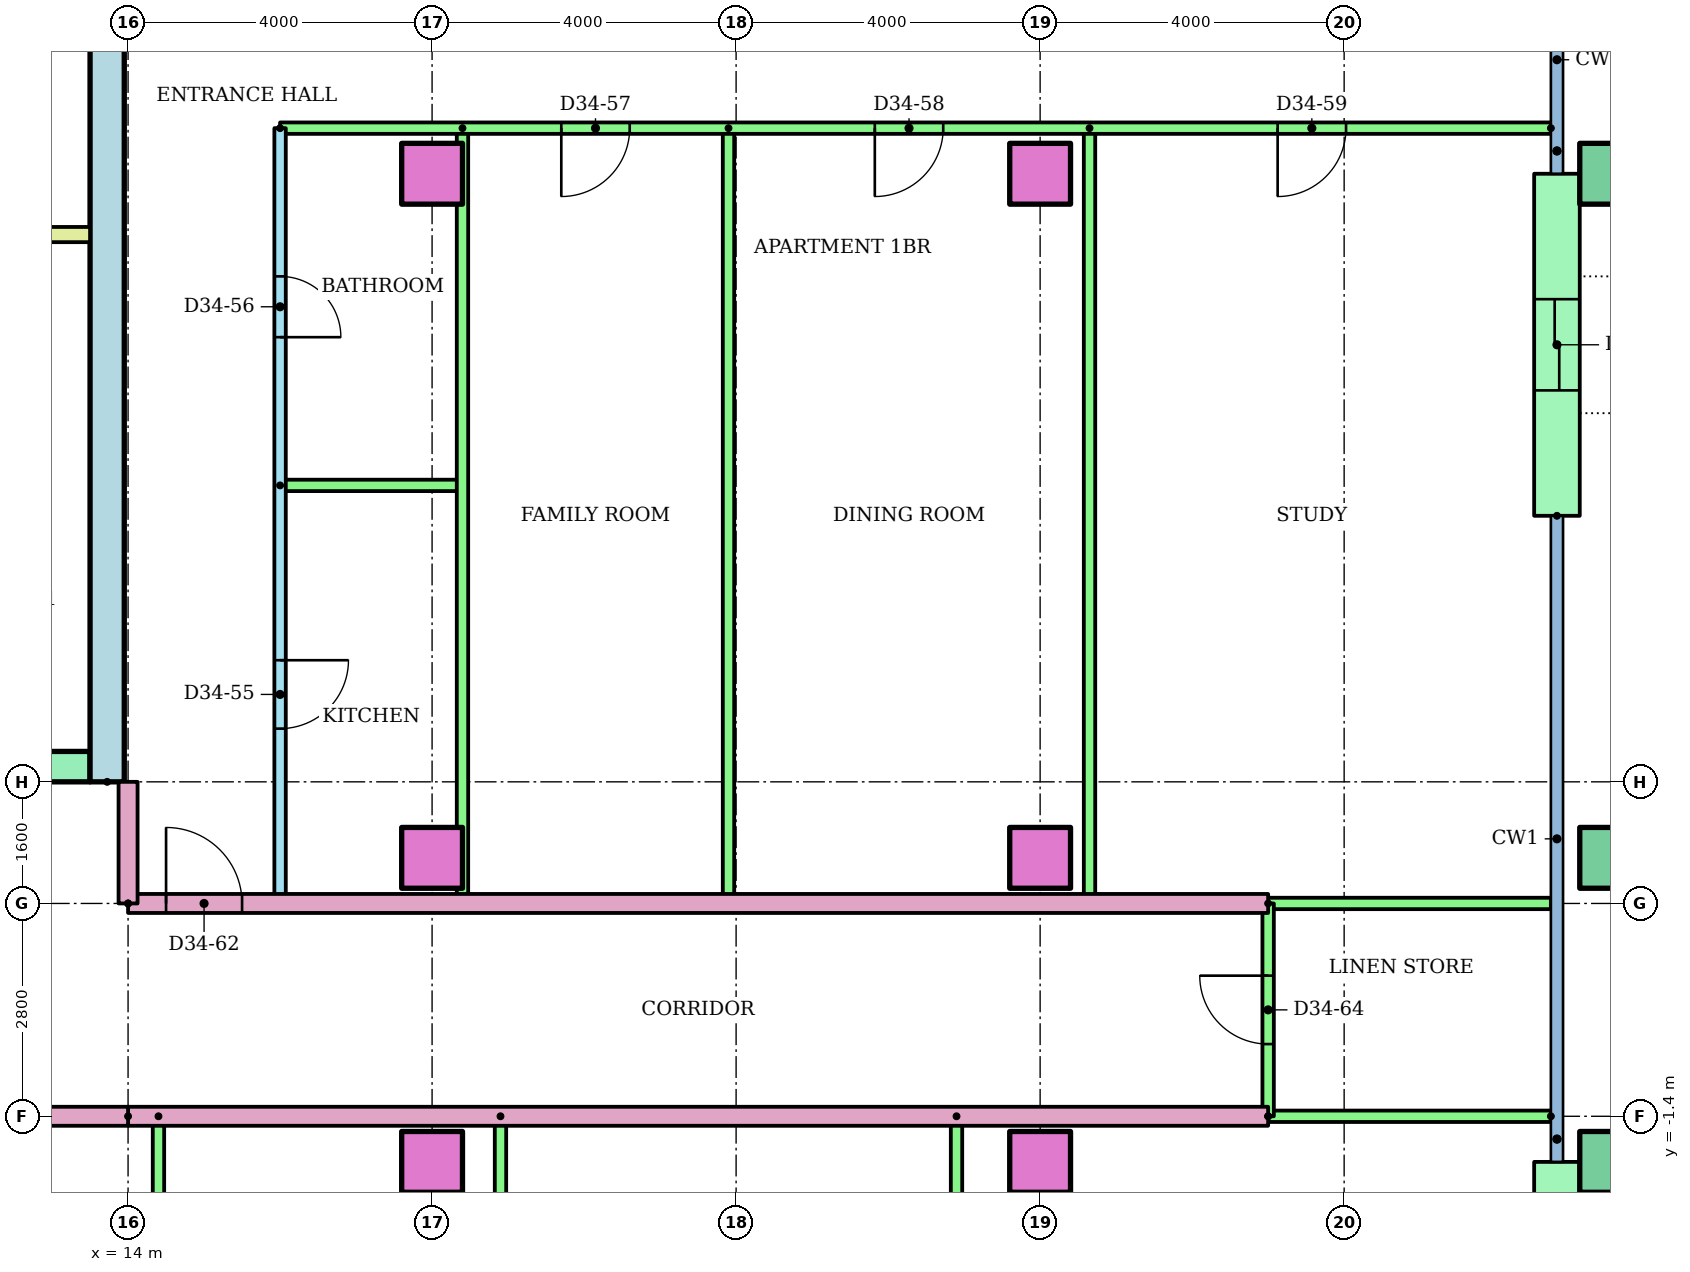
"""IFC4 building model, lengths in metres.
Left out: names, types, materials, properties, quantities, classifications, styles, units other than length and angle.
Written with IfcOpenShell. Run it as: python <this file> out.ifc"""

import sys

from ifc_helpers import new_model, si_unit, direction, frame, frame_2d, origin, origin_2d, place, context, subcontext, project, spatial, rectangle, hollow_rectangle, extrude, element, fill, save


model = new_model("IFC4")
c1 = context("Model", 3, precision=1e-05, world=origin(), true_north=direction((0.0, 1.0)))
c2 = subcontext(c1, "Body", "Model", "MODEL_VIEW")
j1 = project(units=[si_unit("LENGTHUNIT", "METRE"), si_unit("PLANEANGLEUNIT", "RADIAN")], contexts=[c1])
p1 = place(None, origin())
s1 = spatial("IfcSite", under=j1, at=p1, CompositionType="ELEMENT")
p2 = place(p1, origin())
s2 = spatial("IfcBuilding", under=s1, at=p2, CompositionType="ELEMENT")
p3 = place(p2, frame((0.0, 0.0, 132.6)))
s3 = spatial("IfcBuildingStorey", under=s2, at=p3, CompositionType="ELEMENT", Elevation=132.6)
for number, where in (
    (1, (18.0, -2.0, 0.0)),
    (2, (26.0, -2.0, 0.0)),
):
    element("IfcColumn", number, at=place(p3, frame(where)), inside=s3, PredefinedType="COLUMN", context=c2, shape_type="SweptSolid", body=[
        extrude(rectangle(XDim=0.8, YDim=0.8, at=origin_2d()), origin(), (0.0, 0.0, 1.0), 3.2),
    ])
p4 = place(p3, frame((33.5, -2.0, 0.0)))
e3 = element("IfcColumn", 3, at=p4, inside=s3, PredefinedType="COLUMN", context=c2, shape_type="SweptSolid", body=[
    extrude(hollow_rectangle(XDim=0.8, YDim=0.8, WallThickness=0.04, at=origin_2d()), origin(), (0.0, 0.0, 1.0), 3.2),
])
for number, where in (
    (4, (18.0, 2.0, 0.0)),
    (5, (26.0, 2.0, 0.0)),
):
    element("IfcColumn", number, at=place(p3, frame(where)), inside=s3, PredefinedType="COLUMN", context=c2, shape_type="SweptSolid", body=[
        extrude(rectangle(XDim=0.8, YDim=0.8, at=origin_2d()), origin(), (0.0, 0.0, 1.0), 3.2),
    ])
p5 = place(p3, frame((33.5, 2.0, 0.0)))
e6 = element("IfcColumn", 6, at=p5, inside=s3, PredefinedType="COLUMN", context=c2, shape_type="SweptSolid", body=[
    extrude(hollow_rectangle(XDim=0.8, YDim=0.8, WallThickness=0.04, at=origin_2d()), origin(), (0.0, 0.0, 1.0), 3.2),
])
for number, where in (
    (7, (18.0, 11.0, 0.0)),
    (8, (26.0, 11.0, 0.0)),
):
    element("IfcColumn", number, at=place(p3, frame(where)), inside=s3, PredefinedType="COLUMN", context=c2, shape_type="SweptSolid", body=[
        extrude(rectangle(XDim=0.8, YDim=0.8, at=origin_2d()), origin(), (0.0, 0.0, 1.0), 3.2),
    ])
p6 = place(p3, frame((33.5, 11.0, 0.0)))
e9 = element("IfcColumn", 9, at=p6, inside=s3, PredefinedType="COLUMN", context=c2, shape_type="SweptSolid", body=[
    extrude(hollow_rectangle(XDim=0.8, YDim=0.8, WallThickness=0.04, at=origin_2d()), origin(), (0.0, 0.0, 1.0), 3.2),
])
p7 = place(p3, frame((32.8, -5.7, 0.0), z_axis=(0.0, 0.0, 1.0), x_axis=(0.0, 1.0, 0.0)))
e10 = element("IfcWall", 10, at=p7, inside=s3, PredefinedType="STANDARD", context=c2, shape_type="SweptSolid", body=[
    extrude(rectangle(XDim=3.7, YDim=0.6, at=frame_2d((1.85, 0.0))), origin(), (0.0, 0.0, 1.0), 2.92),
])
p8 = place(p7, frame((1.25, 0.0, 0.0)))
e11 = element("IfcOpeningElement", 11, at=p8, cuts=e10, PredefinedType="OPENING", context=c2, shape_type="SweptSolid", body=[
    extrude(rectangle(XDim=1.2, YDim=2.1, at=frame_2d((0.6, 1.05))), frame((0.0, 0.31, 0.0), z_axis=(0.0, -1.0, 0.0), x_axis=(1.0, 0.0, 0.0)), (0.0, 0.0, 1.0), 0.62),
])
p9 = place(p3, frame((32.8, 6.5, 0.0), z_axis=(0.0, 0.0, 1.0), x_axis=(0.0, 1.0, 0.0)))
e12 = element("IfcWall", 12, at=p9, inside=s3, PredefinedType="STANDARD", context=c2, shape_type="SweptSolid", body=[
    extrude(rectangle(XDim=4.5, YDim=0.6, at=frame_2d((2.25, 0.0))), origin(), (0.0, 0.0, 1.0), 2.92),
])
p10 = place(p9, frame((1.65, 0.0, 0.0)))
e13 = element("IfcOpeningElement", 13, at=p10, cuts=e12, PredefinedType="OPENING", context=c2, shape_type="SweptSolid", body=[
    extrude(rectangle(XDim=1.2, YDim=2.1, at=frame_2d((0.6, 1.05))), frame((0.0, 0.31, 0.0), z_axis=(0.0, -1.0, 0.0), x_axis=(1.0, 0.0, 0.0)), (0.0, 0.0, 1.0), 0.62),
])
p11 = place(p3, frame((13.725, 3.0, 0.0), z_axis=(0.0, 0.0, 1.0), x_axis=(0.0, 1.0, 0.0)))
e14 = element("IfcWall", 14, at=p11, inside=s3, PredefinedType="SHEAR", context=c2, shape_type="SweptSolid", body=[
    extrude(rectangle(XDim=17.0, YDim=0.45, at=frame_2d((8.5, 0.0))), origin(), (0.0, 0.0, 1.0), 2.92),
])
p12 = place(p3, frame((-13.5, 3.2, 0.0)))
e15 = element("IfcWall", 15, at=p12, inside=s3, PredefinedType="SHEAR", context=c2, shape_type="SweptSolid", body=[
    extrude(rectangle(XDim=27.0, YDim=0.4, at=frame_2d((13.5, 0.0))), origin(), (0.0, 0.0, 1.0), 2.92),
])
p13 = place(p12, frame((6.861, 0.0, 0.0)))
e16 = element("IfcOpeningElement", 16, at=p13, cuts=e15, PredefinedType="OPENING", context=c2, shape_type="SweptSolid", body=[
    extrude(rectangle(XDim=1.1, YDim=2.1, at=frame_2d((0.55, 1.05))), frame((0.0, 0.21, 0.0), z_axis=(0.0, -1.0, 0.0), x_axis=(1.0, 0.0, 0.0)), (0.0, 0.0, 1.0), 0.42),
])
p14 = place(p12, frame((9.906, 0.0, 0.0)))
e17 = element("IfcOpeningElement", 17, at=p14, cuts=e15, PredefinedType="OPENING", context=c2, shape_type="SweptSolid", body=[
    extrude(rectangle(XDim=1.1, YDim=2.1, at=frame_2d((0.55, 1.05))), frame((0.0, 0.21, 0.0), z_axis=(0.0, -1.0, 0.0), x_axis=(1.0, 0.0, 0.0)), (0.0, 0.0, 1.0), 0.42),
])
p15 = place(p12, frame((15.994, 0.0, 0.0)))
e18 = element("IfcOpeningElement", 18, at=p15, cuts=e15, PredefinedType="OPENING", context=c2, shape_type="SweptSolid", body=[
    extrude(rectangle(XDim=1.1, YDim=2.1, at=frame_2d((0.55, 1.05))), frame((0.0, 0.21, 0.0), z_axis=(0.0, -1.0, 0.0), x_axis=(1.0, 0.0, 0.0)), (0.0, 0.0, 1.0), 0.42),
])
p16 = place(p12, frame((19.039, 0.0, 0.0)))
e19 = element("IfcOpeningElement", 19, at=p16, cuts=e15, PredefinedType="OPENING", context=c2, shape_type="SweptSolid", body=[
    extrude(rectangle(XDim=1.1, YDim=2.1, at=frame_2d((0.55, 1.05))), frame((0.0, 0.21, 0.0), z_axis=(0.0, -1.0, 0.0), x_axis=(1.0, 0.0, 0.0)), (0.0, 0.0, 1.0), 0.42),
])
p17 = place(p12, frame((12.6, 0.0, 0.0)))
e20 = element("IfcOpeningElement", 20, at=p17, cuts=e15, PredefinedType="OPENING", context=c2, shape_type="SweptSolid", body=[
    extrude(rectangle(XDim=1.8, YDim=2.1, at=frame_2d((0.9, 1.05))), frame((0.0, 0.21, 0.0), z_axis=(0.0, -1.0, 0.0), x_axis=(1.0, 0.0, 0.0)), (0.0, 0.0, 1.0), 0.42),
])
p18 = place(p3, frame((9.6, 10.2, 0.0)))
e21 = element("IfcWall", 21, at=p18, inside=s3, PredefinedType="PARTITIONING", context=c2, shape_type="SweptSolid", body=[
    extrude(rectangle(XDim=3.9, YDim=0.2, at=frame_2d((1.95, 0.0))), origin(), (0.0, 0.0, 1.0), 2.92),
])
for number, where, z_axis, x_axis in (
    (22, (14.4, -1.4, 0.0), (0.0, 0.0, 1.0), (0.0, -1.0, 0.0)),
    (23, (18.9, -1.4, 0.0), (0.0, 0.0, 1.0), (0.0, -1.0, 0.0)),
    (24, (24.9, -1.4, 0.0), (0.0, 0.0, 1.0), (0.0, -1.0, 0.0)),
):
    element("IfcWall", number, at=place(p3, frame(where, z_axis=z_axis, x_axis=x_axis)), inside=s3, PredefinedType="PARTITIONING", context=c2, shape_type="SweptSolid", body=[
        extrude(rectangle(XDim=7.8, YDim=0.15, at=frame_2d((3.9, 0.0))), origin(), (0.0, 0.0, 1.0), 2.4),
    ])
p19 = place(p3, frame((29.0, -1.4, 0.0), z_axis=(0.0, 0.0, 1.0), x_axis=(-1.0, 0.0, 0.0)))
e25 = element("IfcWall", 25, at=p19, inside=s3, PredefinedType="PARTITIONING", context=c2, shape_type="SweptSolid", body=[
    extrude(rectangle(XDim=15.0, YDim=0.25, at=frame_2d((7.5, 0.0))), origin(), (0.0, 0.0, 1.0), 2.4),
])
p20 = place(p3, frame((32.72, -1.4, 0.0), z_axis=(0.0, 0.0, 1.0), x_axis=(-1.0, 0.0, 0.0)))
e26 = element("IfcWall", 26, at=p20, inside=s3, PredefinedType="PARTITIONING", context=c2, shape_type="SweptSolid", body=[
    extrude(rectangle(XDim=3.72, YDim=0.15, at=frame_2d((1.86, 0.0))), origin(), (0.0, 0.0, 1.0), 2.4),
])
p21 = place(p3, frame((16.0, 11.6, 0.0), z_axis=(0.0, 0.0, 1.0), x_axis=(0.0, -1.0, 0.0)))
e27 = element("IfcWall", 27, at=p21, inside=s3, PredefinedType="PARTITIONING", context=c2, shape_type="SweptSolid", body=[
    extrude(rectangle(XDim=10.2, YDim=0.15, at=frame_2d((5.1, 0.0))), origin(), (0.0, 0.0, 1.0), 2.4),
])
p22 = place(p21, frame((7.0, 0.0, 0.0)))
e28 = element("IfcOpeningElement", 28, at=p22, cuts=e27, PredefinedType="OPENING", context=c2, shape_type="SweptSolid", body=[
    extrude(rectangle(XDim=0.9, YDim=2.1, at=frame_2d((0.45, 1.05))), frame((0.0, 0.085, 0.0), z_axis=(0.0, -1.0, 0.0), x_axis=(1.0, 0.0, 0.0)), (0.0, 0.0, 1.0), 0.17),
])
p23 = place(p21, frame((1.95, 0.0, 0.0)))
e29 = element("IfcOpeningElement", 29, at=p23, cuts=e27, PredefinedType="OPENING", context=c2, shape_type="SweptSolid", body=[
    extrude(rectangle(XDim=0.8, YDim=2.1, at=frame_2d((0.4, 1.05))), frame((0.0, 0.085, 0.0), z_axis=(0.0, -1.0, 0.0), x_axis=(1.0, 0.0, 0.0)), (0.0, 0.0, 1.0), 0.17),
])
p24 = place(p3, frame((16.0, 6.9, 0.0)))
e30 = element("IfcWall", 30, at=p24, inside=s3, PredefinedType="PARTITIONING", context=c2, shape_type="SweptSolid", body=[
    extrude(rectangle(XDim=2.4, YDim=0.15, at=frame_2d((1.2, 0.0))), origin(), (0.0, 0.0, 1.0), 2.4),
])
for number, where, z_axis, x_axis in (
    (31, (18.4, 11.6, 0.0), (0.0, 0.0, 1.0), (0.0, -1.0, 0.0)),
    (32, (21.9, 11.6, 0.0), (0.0, 0.0, 1.0), (0.0, -1.0, 0.0)),
    (33, (26.65, 11.6, 0.0), (0.0, 0.0, 1.0), (0.0, -1.0, 0.0)),
):
    element("IfcWall", number, at=place(p3, frame(where, z_axis=z_axis, x_axis=x_axis)), inside=s3, PredefinedType="PARTITIONING", context=c2, shape_type="SweptSolid", body=[
        extrude(rectangle(XDim=10.2, YDim=0.15, at=frame_2d((5.1, 0.0))), origin(), (0.0, 0.0, 1.0), 2.4),
    ])
p25 = place(p3, frame((32.72, 11.6, 0.0), z_axis=(0.0, 0.0, 1.0), x_axis=(-1.0, 0.0, 0.0)))
e34 = element("IfcWall", 34, at=p25, inside=s3, PredefinedType="PARTITIONING", context=c2, shape_type="SweptSolid", body=[
    extrude(rectangle(XDim=16.72, YDim=0.15, at=frame_2d((8.36, 0.0))), origin(), (0.0, 0.0, 1.0), 2.4),
])
p26 = place(p25, frame((12.12, 0.0, 0.0)))
e35 = element("IfcOpeningElement", 35, at=p26, cuts=e34, PredefinedType="OPENING", context=c2, shape_type="SweptSolid", body=[
    extrude(rectangle(XDim=0.9, YDim=2.1, at=frame_2d((0.45, 1.05))), frame((0.0, 0.085, 0.0), z_axis=(0.0, -1.0, 0.0), x_axis=(1.0, 0.0, 0.0)), (0.0, 0.0, 1.0), 0.17),
])
p27 = place(p25, frame((7.995, 0.0, 0.0)))
e36 = element("IfcOpeningElement", 36, at=p27, cuts=e34, PredefinedType="OPENING", context=c2, shape_type="SweptSolid", body=[
    extrude(rectangle(XDim=0.9, YDim=2.1, at=frame_2d((0.45, 1.05))), frame((0.0, 0.085, 0.0), z_axis=(0.0, -1.0, 0.0), x_axis=(1.0, 0.0, 0.0)), (0.0, 0.0, 1.0), 0.17),
])
p28 = place(p25, frame((2.695, 0.0, 0.0)))
e37 = element("IfcOpeningElement", 37, at=p28, cuts=e34, PredefinedType="OPENING", context=c2, shape_type="SweptSolid", body=[
    extrude(rectangle(XDim=0.9, YDim=2.1, at=frame_2d((0.45, 1.05))), frame((0.0, 0.085, 0.0), z_axis=(0.0, -1.0, 0.0), x_axis=(1.0, 0.0, 0.0)), (0.0, 0.0, 1.0), 0.17),
])
p29 = place(p3, frame((14.0, 1.4, 0.0)))
e38 = element("IfcWall", 38, at=p29, inside=s3, PredefinedType="PARTITIONING", context=c2, shape_type="SweptSolid", body=[
    extrude(rectangle(XDim=15.0, YDim=0.25, at=frame_2d((7.5, 0.0))), origin(), (0.0, 0.0, 1.0), 2.4),
])
p30 = place(p29, frame((0.5, 0.0, 0.0)))
e39 = element("IfcOpeningElement", 39, at=p30, cuts=e38, PredefinedType="OPENING", context=c2, shape_type="SweptSolid", body=[
    extrude(rectangle(XDim=1.0, YDim=2.1, at=frame_2d((0.5, 1.05))), frame((0.0, 0.135, 0.0), z_axis=(0.0, -1.0, 0.0), x_axis=(1.0, 0.0, 0.0)), (0.0, 0.0, 1.0), 0.27),
])
p31 = place(p3, frame((29.0, 1.4, 0.0)))
e40 = element("IfcWall", 40, at=p31, inside=s3, PredefinedType="PARTITIONING", context=c2, shape_type="SweptSolid", body=[
    extrude(rectangle(XDim=3.72, YDim=0.15, at=frame_2d((1.86, 0.0))), origin(), (0.0, 0.0, 1.0), 2.4),
])
p32 = place(p3, frame((29.0, -1.4, 0.0), z_axis=(0.0, 0.0, 1.0), x_axis=(0.0, 1.0, 0.0)))
e41 = element("IfcWall", 41, at=p32, inside=s3, PredefinedType="PARTITIONING", context=c2, shape_type="SweptSolid", body=[
    extrude(rectangle(XDim=2.8, YDim=0.15, at=frame_2d((1.4, 0.0))), origin(), (0.0, 0.0, 1.0), 2.4),
])
p33 = place(p32, frame((0.95, 0.0, 0.0)))
e42 = element("IfcOpeningElement", 42, at=p33, cuts=e41, PredefinedType="OPENING", context=c2, shape_type="SweptSolid", body=[
    extrude(rectangle(XDim=0.9, YDim=2.1, at=frame_2d((0.45, 1.05))), frame((0.0, 0.085, 0.0), z_axis=(0.0, -1.0, 0.0), x_axis=(1.0, 0.0, 0.0)), (0.0, 0.0, 1.0), 0.17),
])
p34 = place(p3, frame((14.0, -1.4, 0.0), z_axis=(0.0, 0.0, 1.0), x_axis=(-1.0, 0.0, 0.0)))
e43 = element("IfcWall", 43, at=p34, inside=s3, PredefinedType="PARTITIONING", context=c2, shape_type="SweptSolid", body=[
    extrude(rectangle(XDim=28.0, YDim=0.25, at=frame_2d((14.0, 0.0))), origin(), (0.0, 0.0, 1.0), 2.4),
])
p35 = place(p34, frame((20.618, 0.0, 0.0)))
e44 = element("IfcOpeningElement", 44, at=p35, cuts=e43, PredefinedType="OPENING", context=c2, shape_type="SweptSolid", body=[
    extrude(rectangle(XDim=1.0, YDim=2.1, at=frame_2d((0.5, 1.05))), frame((0.0, 0.135, 0.0), z_axis=(0.0, -1.0, 0.0), x_axis=(1.0, 0.0, 0.0)), (0.0, 0.0, 1.0), 0.27),
])
p36 = place(p34, frame((18.382, 0.0, 0.0)))
e45 = element("IfcOpeningElement", 45, at=p36, cuts=e43, PredefinedType="OPENING", context=c2, shape_type="SweptSolid", body=[
    extrude(rectangle(XDim=1.0, YDim=2.1, at=frame_2d((0.5, 1.05))), frame((0.0, 0.135, 0.0), z_axis=(0.0, -1.0, 0.0), x_axis=(1.0, 0.0, 0.0)), (0.0, 0.0, 1.0), 0.27),
])
p37 = place(p34, frame((2.382, 0.0, 0.0)))
e46 = element("IfcOpeningElement", 46, at=p37, cuts=e43, PredefinedType="OPENING", context=c2, shape_type="SweptSolid", body=[
    extrude(rectangle(XDim=1.0, YDim=2.1, at=frame_2d((0.5, 1.05))), frame((0.0, 0.135, 0.0), z_axis=(0.0, -1.0, 0.0), x_axis=(1.0, 0.0, 0.0)), (0.0, 0.0, 1.0), 0.27),
])
p38 = place(p3, frame((14.0, 1.4, 0.0), z_axis=(0.0, 0.0, 1.0), x_axis=(0.0, 1.0, 0.0)))
e47 = element("IfcWall", 47, at=p38, inside=s3, PredefinedType="PARTITIONING", context=c2, shape_type="SweptSolid", body=[
    extrude(rectangle(XDim=1.6, YDim=0.25, at=frame_2d((0.8, 0.0))), origin(), (0.0, 0.0, 1.0), 2.4),
])
p39 = place(p22, origin())
e48 = element("IfcDoor", 48, at=p39, inside=s3, OperationType="SINGLE_SWING_LEFT", PredefinedType="DOOR", context=c2, shape_type="SweptSolid", body=[
    extrude(rectangle(XDim=0.9, YDim=2.1, at=frame_2d((0.45, 1.05))), frame((0.0, 0.025, 0.0), z_axis=(0.0, -1.0, 0.0), x_axis=(1.0, 0.0, 0.0)), (0.0, 0.0, 1.0), 0.05),
])
fill(e28, e48)
p40 = place(p23, origin())
e49 = element("IfcDoor", 49, at=p40, inside=s3, OperationType="SINGLE_SWING_RIGHT", PredefinedType="DOOR", context=c2, shape_type="SweptSolid", body=[
    extrude(rectangle(XDim=0.8, YDim=2.1, at=frame_2d((0.4, 1.05))), frame((0.0, 0.025, 0.0), z_axis=(0.0, -1.0, 0.0), x_axis=(1.0, 0.0, 0.0)), (0.0, 0.0, 1.0), 0.05),
])
fill(e29, e49)
p41 = place(p26, origin())
e50 = element("IfcDoor", 50, at=p41, inside=s3, OperationType="SINGLE_SWING_RIGHT", PredefinedType="DOOR", context=c2, shape_type="SweptSolid", body=[
    extrude(rectangle(XDim=0.9, YDim=2.1, at=frame_2d((0.45, 1.05))), frame((0.0, 0.025, 0.0), z_axis=(0.0, -1.0, 0.0), x_axis=(1.0, 0.0, 0.0)), (0.0, 0.0, 1.0), 0.05),
])
fill(e35, e50)
p42 = place(p27, origin())
e51 = element("IfcDoor", 51, at=p42, inside=s3, OperationType="SINGLE_SWING_RIGHT", PredefinedType="DOOR", context=c2, shape_type="SweptSolid", body=[
    extrude(rectangle(XDim=0.9, YDim=2.1, at=frame_2d((0.45, 1.05))), frame((0.0, 0.025, 0.0), z_axis=(0.0, -1.0, 0.0), x_axis=(1.0, 0.0, 0.0)), (0.0, 0.0, 1.0), 0.05),
])
fill(e36, e51)
p43 = place(p28, origin())
e52 = element("IfcDoor", 52, at=p43, inside=s3, OperationType="SINGLE_SWING_RIGHT", PredefinedType="DOOR", context=c2, shape_type="SweptSolid", body=[
    extrude(rectangle(XDim=0.9, YDim=2.1, at=frame_2d((0.45, 1.05))), frame((0.0, 0.025, 0.0), z_axis=(0.0, -1.0, 0.0), x_axis=(1.0, 0.0, 0.0)), (0.0, 0.0, 1.0), 0.05),
])
fill(e37, e52)
p44 = place(p30, origin())
e53 = element("IfcDoor", 53, at=p44, inside=s3, OperationType="SINGLE_SWING_LEFT", PredefinedType="DOOR", context=c2, shape_type="SweptSolid", body=[
    extrude(rectangle(XDim=1.0, YDim=2.1, at=frame_2d((0.5, 1.05))), frame((0.0, 0.025, 0.0), z_axis=(0.0, -1.0, 0.0), x_axis=(1.0, 0.0, 0.0)), (0.0, 0.0, 1.0), 0.05),
])
fill(e39, e53)
p45 = place(p33, origin())
e54 = element("IfcDoor", 54, at=p45, inside=s3, OperationType="SINGLE_SWING_RIGHT", PredefinedType="DOOR", context=c2, shape_type="SweptSolid", body=[
    extrude(rectangle(XDim=0.9, YDim=2.1, at=frame_2d((0.45, 1.05))), frame((0.0, 0.025, 0.0), z_axis=(0.0, -1.0, 0.0), x_axis=(1.0, 0.0, 0.0)), (0.0, 0.0, 1.0), 0.05),
])
fill(e42, e54)
p46 = place(p10, origin())
e55 = element("IfcDoor", 55, at=p46, inside=s3, OperationType="SLIDING_TO_LEFT", PredefinedType="DOOR", context=c2, shape_type="SweptSolid", body=[
    extrude(rectangle(XDim=1.2, YDim=2.1, at=frame_2d((0.6, 1.05))), frame((0.0, 0.025, 0.0), z_axis=(0.0, -1.0, 0.0), x_axis=(1.0, 0.0, 0.0)), (0.0, 0.0, 1.0), 0.05),
])
fill(e13, e55)
save(model, sys.argv[1])
